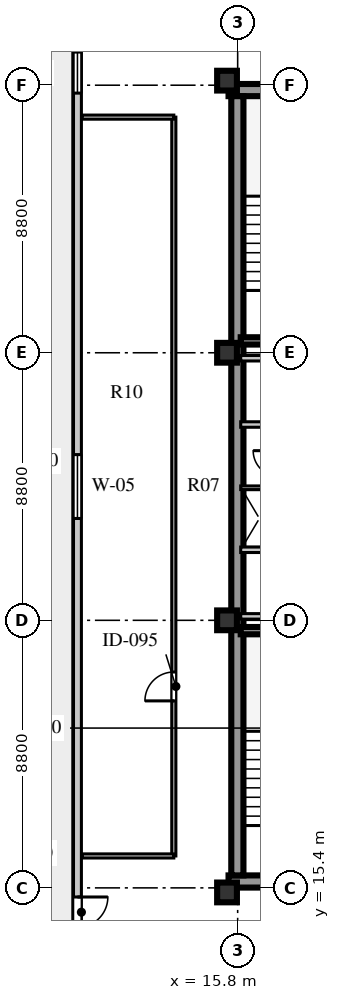
"""IFC4 building model, lengths in metres.
Left out: names, types, materials, properties, quantities, classifications, styles, units other than length and angle.
Written with IfcOpenShell. Run it as: python <this file> out.ifc"""

import sys

from ifc_helpers import new_model, si_unit, direction, frame, frame_2d, origin, origin_2d, place, context, subcontext, project, spatial, rectangle, extrude, element, fill, save


model = new_model("IFC4")
c1 = context("Model", 3, precision=1e-05, world=origin(), true_north=direction((0.0, 1.0)))
c2 = subcontext(c1, "Body", "Model", "MODEL_VIEW")
j1 = project(units=[si_unit("LENGTHUNIT", "METRE"), si_unit("PLANEANGLEUNIT", "RADIAN")], contexts=[c1])
p1 = place(None, origin())
s1 = spatial("IfcSite", under=j1, at=p1, CompositionType="ELEMENT")
p2 = place(p1, origin())
s2 = spatial("IfcBuilding", under=s1, at=p2, CompositionType="ELEMENT")
p3 = place(p2, frame((0.0, 0.0, 296.0)))
s3 = spatial("IfcBuildingStorey", under=s2, at=p3, CompositionType="ELEMENT", Elevation=296.0)
for number, where, z_axis, x_axis in (
    (1, (15.5, 15.61, 0.0), (0.0, 0.0, 1.0), (1.0, 0.0, 0.0)),
    (2, (15.5, 41.64, 0.0), (0.0, 0.0, 1.0), (1.0, 0.0, 0.0)),
):
    element("IfcWall", number, at=place(p3, frame(where, z_axis=z_axis, x_axis=x_axis)), inside=s3, PredefinedType="SHEAR", context=c2, shape_type="SweptSolid", body=[
        extrude(rectangle(XDim=9.48, YDim=0.4, at=frame_2d((4.74, 0.0))), origin(), (0.0, 0.0, 1.0), 3.66),
    ])
p4 = place(p3, frame((15.79, 15.81, 0.0), z_axis=(0.0, 0.0, 1.0), x_axis=(0.0, 1.0, 0.0)))
e3 = element("IfcWall", 3, at=p4, inside=s3, PredefinedType="SHEAR", context=c2, shape_type="SweptSolid", body=[
    extrude(rectangle(XDim=25.63, YDim=0.4, at=frame_2d((12.815, 0.0))), origin(), (0.0, 0.0, 1.0), 3.66),
])
for number, where, z_axis, x_axis in (
    (4, (15.45, 15.25, 0.0), (0.0, 0.0, 1.0), (1.0, 0.0, 0.0)),
    (5, (15.45, 24.2, 0.0), (0.0, 0.0, 1.0), (1.0, 0.0, 0.0)),
    (6, (15.45, 33.0, 0.0), (0.0, 0.0, 1.0), (1.0, 0.0, 0.0)),
    (7, (15.45, 41.95, 0.0), (0.0, 0.0, 1.0), (1.0, 0.0, 0.0)),
):
    element("IfcColumn", number, at=place(p3, frame(where, z_axis=z_axis, x_axis=x_axis)), inside=s3, PredefinedType="COLUMN", context=c2, shape_type="SweptSolid", body=[
        extrude(rectangle(XDim=0.65, YDim=0.65, at=origin_2d()), origin(), (0.0, 0.0, 1.0), 3.66),
    ])
p5 = place(p3, frame((10.53, 43.79, 0.0), z_axis=(0.0, 0.0, 1.0), x_axis=(0.0, -1.0, 0.0)))
e8 = element("IfcWall", 8, at=p5, inside=s3, PredefinedType="SOLIDWALL", context=c2, shape_type="SweptSolid", body=[
    extrude(rectangle(XDim=30.38, YDim=0.26, at=frame_2d((15.19, 0.0))), origin(), (0.0, 0.0, 1.0), 3.66),
])
p6 = place(p5, frame((28.69, 0.0, 0.0)))
e9 = element("IfcOpeningElement", 9, at=p6, cuts=e8, PredefinedType="OPENING", context=c2, shape_type="SweptSolid", body=[
    extrude(rectangle(XDim=1.0, YDim=2.05, at=frame_2d((0.5, 1.025))), frame((0.0, 0.14, 0.0), z_axis=(0.0, -1.0, 0.0), x_axis=(1.0, 0.0, 0.0)), (0.0, 0.0, 1.0), 0.28),
])
p7 = place(p5, frame((14.14, 0.0, 0.8)))
e10 = element("IfcOpeningElement", 10, at=p7, cuts=e8, PredefinedType="OPENING", context=c2, shape_type="SweptSolid", body=[
    extrude(rectangle(XDim=2.1, YDim=1.95, at=frame_2d((1.05, 0.975))), frame((0.0, 0.14, 0.0), z_axis=(0.0, -1.0, 0.0), x_axis=(1.0, 0.0, 0.0)), (0.0, 0.0, 1.0), 0.28),
])
p8 = place(p5, frame((0.9, 0.0, 0.8)))
e11 = element("IfcOpeningElement", 11, at=p8, cuts=e8, PredefinedType="OPENING", context=c2, shape_type="SweptSolid", body=[
    extrude(rectangle(XDim=1.35, YDim=1.9, at=frame_2d((0.675, 0.95))), frame((0.0, 0.14, 0.0), z_axis=(0.0, -1.0, 0.0), x_axis=(1.0, 0.0, 0.0)), (0.0, 0.0, 1.0), 0.28),
])
p9 = place(p3, frame((15.9, 23.86, 0.0), z_axis=(0.0, 0.0, 1.0), x_axis=(1.0, 0.0, 0.0)))
e12 = element("IfcWall", 12, at=p9, inside=s3, PredefinedType="SHEAR", context=c2, shape_type="SweptSolid", body=[
    extrude(rectangle(XDim=3.52, YDim=0.24, at=frame_2d((1.76, 0.0))), origin(), (0.0, 0.0, 1.0), 3.9),
])
p10 = place(p3, frame((15.9, 26.52, 0.0), z_axis=(0.0, 0.0, 1.0), x_axis=(1.0, 0.0, 0.0)))
e13 = element("IfcWall", 13, at=p10, inside=s3, PredefinedType="SOLIDWALL", context=c2, shape_type="SweptSolid", body=[
    extrude(rectangle(XDim=8.68, YDim=0.18, at=frame_2d((4.34, 0.0))), origin(), (0.0, 0.0, 1.0), 3.66),
])
p11 = place(p10, frame((2.5, 0.0, 0.0)))
e14 = element("IfcOpeningElement", 14, at=p11, cuts=e13, PredefinedType="OPENING", context=c2, shape_type="SweptSolid", body=[
    extrude(rectangle(XDim=0.95, YDim=2.1, at=frame_2d((0.475, 1.05))), frame((0.0, 0.1, 0.0), z_axis=(0.0, -1.0, 0.0), x_axis=(1.0, 0.0, 0.0)), (0.0, 0.0, 1.0), 0.2),
])
p12 = place(p10, frame((6.0, 0.0, 0.0)))
e15 = element("IfcOpeningElement", 15, at=p12, cuts=e13, PredefinedType="OPENING", context=c2, shape_type="SweptSolid", body=[
    extrude(rectangle(XDim=0.95, YDim=2.1, at=frame_2d((0.475, 1.05))), frame((0.0, 0.1, 0.0), z_axis=(0.0, -1.0, 0.0), x_axis=(1.0, 0.0, 0.0)), (0.0, 0.0, 1.0), 0.2),
])
p13 = place(p3, frame((15.9, 24.33, 0.0), z_axis=(0.0, 0.0, 1.0), x_axis=(1.0, 0.0, 0.0)))
e16 = element("IfcWall", 16, at=p13, inside=s3, PredefinedType="SOLIDWALL", context=c2, shape_type="SweptSolid", body=[
    extrude(rectangle(XDim=8.68, YDim=0.18, at=frame_2d((4.34, 0.0))), origin(), (0.0, 0.0, 1.0), 3.06),
])
p14 = place(p3, frame((15.9, 28.56, 0.0), z_axis=(0.0, 0.0, 1.0), x_axis=(1.0, 0.0, 0.0)))
e17 = element("IfcWall", 17, at=p14, inside=s3, PredefinedType="PARTITIONING", context=c2, shape_type="SweptSolid", body=[
    extrude(rectangle(XDim=1.2, YDim=0.12, at=frame_2d((0.6, 0.0))), origin(), (0.0, 0.0, 1.0), 3.66),
])
p15 = place(p3, frame((15.9, 30.64, 0.0), z_axis=(0.0, 0.0, 1.0), x_axis=(1.0, 0.0, 0.0)))
e18 = element("IfcWall", 18, at=p15, inside=s3, PredefinedType="SOLIDWALL", context=c2, shape_type="SweptSolid", body=[
    extrude(rectangle(XDim=8.68, YDim=0.18, at=frame_2d((4.34, 0.0))), origin(), (0.0, 0.0, 1.0), 3.66),
])
p16 = place(p15, frame((3.7, 0.0, 0.0)))
e19 = element("IfcOpeningElement", 19, at=p16, cuts=e18, PredefinedType="OPENING", context=c2, shape_type="SweptSolid", body=[
    extrude(rectangle(XDim=0.95, YDim=2.1, at=frame_2d((0.475, 1.05))), frame((0.0, 0.1, 0.0), z_axis=(0.0, -1.0, 0.0), x_axis=(1.0, 0.0, 0.0)), (0.0, 0.0, 1.0), 0.2),
])
p17 = place(p3, frame((15.9, 32.82, 0.0), z_axis=(0.0, 0.0, 1.0), x_axis=(1.0, 0.0, 0.0)))
e20 = element("IfcWall", 20, at=p17, inside=s3, PredefinedType="SOLIDWALL", context=c2, shape_type="SweptSolid", body=[
    extrude(rectangle(XDim=8.68, YDim=0.18, at=frame_2d((4.34, 0.0))), origin(), (0.0, 0.0, 1.0), 3.06),
])
p18 = place(p3, frame((15.9, 33.39, 0.0), z_axis=(0.0, 0.0, 1.0), x_axis=(1.0, 0.0, 0.0)))
e21 = element("IfcWall", 21, at=p18, inside=s3, PredefinedType="SHEAR", context=c2, shape_type="SweptSolid", body=[
    extrude(rectangle(XDim=3.52, YDim=0.24, at=frame_2d((1.76, 0.0))), origin(), (0.0, 0.0, 1.0), 3.9),
])
p19 = place(p3, frame((13.7, 16.45, 0.0), z_axis=(0.0, 0.0, 1.0), x_axis=(0.0, 1.0, 0.0)))
e22 = element("IfcWall", 22, at=p19, inside=s3, PredefinedType="PARTITIONING", context=c2, shape_type="SweptSolid", body=[
    extrude(rectangle(XDim=24.3, YDim=0.135, at=frame_2d((12.15, 0.0))), origin(), (0.0, 0.0, 1.0), 3.66),
])
p20 = place(p19, frame((5.1, 0.0, 0.0)))
e23 = element("IfcOpeningElement", 23, at=p20, cuts=e22, PredefinedType="OPENING", context=c2, shape_type="SweptSolid", body=[
    extrude(rectangle(XDim=0.95, YDim=2.08, at=frame_2d((0.475, 1.04))), frame((0.0, 0.078, 0.0), z_axis=(0.0, -1.0, 0.0), x_axis=(1.0, 0.0, 0.0)), (0.0, 0.0, 1.0), 0.155),
])
for number, where, z_axis, x_axis in (
    (24, (10.68, 16.45, 0.0), (0.0, 0.0, 1.0), (1.0, 0.0, 0.0)),
    (25, (10.68, 40.75, 0.0), (0.0, 0.0, 1.0), (1.0, 0.0, 0.0)),
):
    element("IfcWall", number, at=place(p3, frame(where, z_axis=z_axis, x_axis=x_axis)), inside=s3, PredefinedType="PARTITIONING", context=c2, shape_type="SweptSolid", body=[
        extrude(rectangle(XDim=3.02, YDim=0.135, at=frame_2d((1.51, 0.0))), origin(), (0.0, 0.0, 1.0), 3.66),
    ])
p21 = place(p6, frame((1.0, 0.0, 0.0), z_axis=(0.0, 0.0, 1.0), x_axis=(-1.0, 0.0, 0.0)))
e26 = element("IfcDoor", 26, at=p21, inside=s3, OperationType="SINGLE_SWING_RIGHT", PredefinedType="DOOR", context=c2, shape_type="SweptSolid", body=[
    extrude(rectangle(XDim=1.0, YDim=2.05, at=frame_2d((0.5, 1.025))), frame((0.0, 0.025, 0.0), z_axis=(0.0, -1.0, 0.0), x_axis=(1.0, 0.0, 0.0)), (0.0, 0.0, 1.0), 0.05),
])
fill(e9, e26)
p22 = place(p7, origin())
e27 = element("IfcWindow", 27, at=p22, inside=s3, PartitioningType="SINGLE_PANEL", PredefinedType="WINDOW", context=c2, shape_type="SweptSolid", body=[
    extrude(rectangle(XDim=2.1, YDim=1.95, at=frame_2d((1.05, 0.975))), frame((0.0, 0.03, 0.0), z_axis=(0.0, -1.0, 0.0), x_axis=(1.0, 0.0, 0.0)), (0.0, 0.0, 1.0), 0.06),
])
fill(e10, e27)
p23 = place(p8, origin())
e28 = element("IfcWindow", 28, at=p23, inside=s3, PartitioningType="SINGLE_PANEL", PredefinedType="WINDOW", context=c2, shape_type="SweptSolid", body=[
    extrude(rectangle(XDim=1.35, YDim=1.9, at=frame_2d((0.675, 0.95))), frame((0.0, 0.03, 0.0), z_axis=(0.0, -1.0, 0.0), x_axis=(1.0, 0.0, 0.0)), (0.0, 0.0, 1.0), 0.06),
])
fill(e11, e28)
p24 = place(p20, origin())
e29 = element("IfcDoor", 29, at=p24, inside=s3, OperationType="SINGLE_SWING_LEFT", PredefinedType="DOOR", context=c2, shape_type="SweptSolid", body=[
    extrude(rectangle(XDim=0.95, YDim=2.08, at=frame_2d((0.475, 1.04))), frame((0.0, 0.025, 0.0), z_axis=(0.0, -1.0, 0.0), x_axis=(1.0, 0.0, 0.0)), (0.0, 0.0, 1.0), 0.05),
])
fill(e23, e29)
save(model, sys.argv[1])
